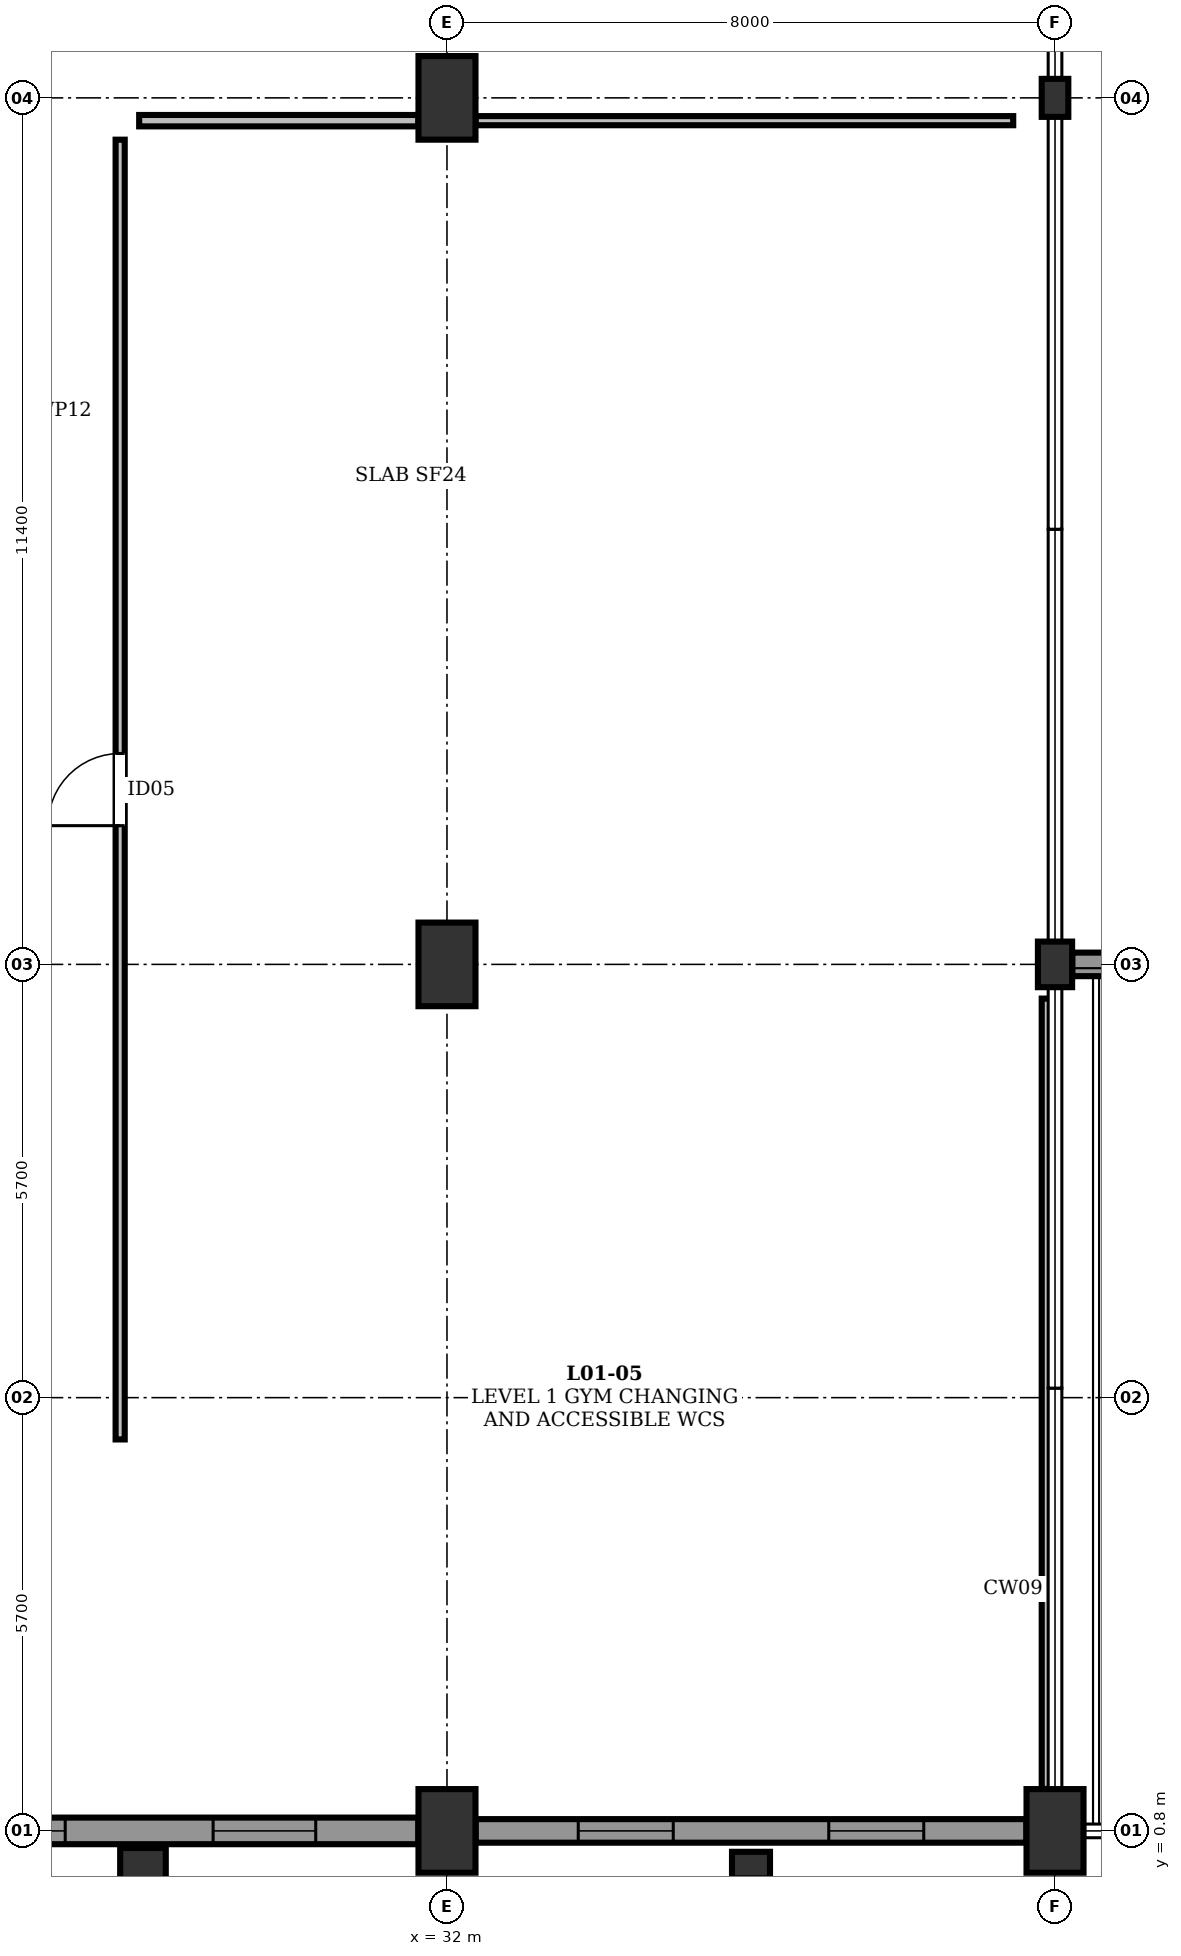
"""IFC4 building model, lengths in metres.
Left out: names, types, materials, properties, quantities, classifications, styles, units other than length and angle.
Written with IfcOpenShell. Run it as: python <this file> out.ifc"""

import sys

from ifc_helpers import new_model, si_unit, direction, frame, frame_2d, origin, origin_2d, place, context, subcontext, project, spatial, rectangle, extrude, element, fill, save


model = new_model("IFC4")
c1 = context("Model", 3, precision=1e-05, world=origin(), true_north=direction((0.0, 1.0)))
c2 = subcontext(c1, "Body", "Model", "MODEL_VIEW")
j1 = project(units=[si_unit("LENGTHUNIT", "METRE"), si_unit("PLANEANGLEUNIT", "RADIAN")], contexts=[c1])
p1 = place(None, origin())
s1 = spatial("IfcSite", under=j1, at=p1, CompositionType="ELEMENT")
p2 = place(p1, origin())
s2 = spatial("IfcBuilding", under=s1, at=p2, CompositionType="ELEMENT")
p3 = place(p2, frame((0.0, 0.0, 5.4)))
s3 = spatial("IfcBuildingStorey", under=s2, at=p3, CompositionType="ELEMENT", Elevation=5.4)
for number, where, z_axis, x_axis in (
    (1, (32.0, 0.8, 0.0), (0.0, 0.0, 1.0), (1.0, 0.0, 0.0)),
    (2, (32.0, 12.2, 0.0), (0.0, 0.0, 1.0), (1.0, 0.0, 0.0)),
    (3, (32.0, 23.6, 0.0), (0.0, 0.0, 1.0), (1.0, 0.0, 0.0)),
    (4, (40.0, 0.8, 0.0), (0.0, 0.0, 1.0), (1.0, 0.0, 0.0)),
):
    element("IfcColumn", number, at=place(p3, frame(where, z_axis=z_axis, x_axis=x_axis)), inside=s3, PredefinedType="COLUMN", context=c2, shape_type="SweptSolid", body=[
        extrude(rectangle(XDim=0.75, YDim=1.1, at=origin_2d()), origin(), (0.0, 0.0, 1.0), 4.8),
    ])
p4 = place(p3, frame((40.0, 12.2, 0.0), z_axis=(0.0, 0.0, 1.0), x_axis=(1.0, 0.0, 0.0)))
e5 = element("IfcColumn", 5, at=p4, inside=s3, PredefinedType="PILASTER", context=c2, shape_type="SweptSolid", body=[
    extrude(rectangle(XDim=0.45, YDim=0.6, at=origin_2d()), origin(), (0.0, 0.0, 1.0), 4.8),
])
p5 = place(p3, frame((40.0, 23.6, 0.0), z_axis=(0.0, 0.0, 1.0), x_axis=(1.0, 0.0, 0.0)))
e6 = element("IfcColumn", 6, at=p5, inside=s3, PredefinedType="PILASTER", context=c2, shape_type="SweptSolid", body=[
    extrude(rectangle(XDim=0.35, YDim=0.5, at=origin_2d()), origin(), (0.0, 0.0, 1.0), 4.8),
])
p6 = place(p3, frame((28.0, 0.35, 0.0), z_axis=(0.0, 0.0, 1.0), x_axis=(0.0, 1.0, 0.0)))
e7 = element("IfcColumn", 7, at=p6, inside=s3, PredefinedType="PILASTER", context=c2, shape_type="SweptSolid", body=[
    extrude(rectangle(XDim=0.45, YDim=0.6, at=origin_2d()), origin(), (0.0, 0.0, 1.0), 4.8),
])
p7 = place(p3, frame((36.0, 0.35, 0.0), z_axis=(0.0, 0.0, 1.0), x_axis=(0.0, 1.0, 0.0)))
e8 = element("IfcColumn", 8, at=p7, inside=s3, PredefinedType="PILASTER", context=c2, shape_type="SweptSolid", body=[
    extrude(rectangle(XDim=0.35, YDim=0.5, at=origin_2d()), origin(), (0.0, 0.0, 1.0), 4.8),
])
p8 = place(p3, frame((24.277, 0.8, 0.0), z_axis=(0.0, 0.0, 1.0), x_axis=(1.0, 0.0, 0.0)))
e9 = element("IfcWall", 9, at=p8, inside=s3, PredefinedType="STANDARD", context=c2, shape_type="SweptSolid", body=[
    extrude(rectangle(XDim=7.346, YDim=0.35, at=frame_2d((3.673, 0.0))), origin(), (0.0, 0.0, 1.0), 3.845),
])
p9 = place(p8, frame((1.35, 0.0, 0.75)))
e10 = element("IfcOpeningElement", 10, at=p9, cuts=e9, PredefinedType="OPENING", context=c2, shape_type="SweptSolid", body=[
    extrude(rectangle(XDim=1.35, YDim=1.55, at=frame_2d((0.675, 0.775))), frame((0.0, 0.187, 0.0), z_axis=(0.0, -1.0, 0.0), x_axis=(1.0, 0.0, 0.0)), (0.0, 0.0, 1.0), 0.374),
])
p10 = place(p8, frame((4.646, 0.0, 0.75)))
e11 = element("IfcOpeningElement", 11, at=p10, cuts=e9, PredefinedType="OPENING", context=c2, shape_type="SweptSolid", body=[
    extrude(rectangle(XDim=1.35, YDim=1.55, at=frame_2d((0.675, 0.775))), frame((0.0, 0.187, 0.0), z_axis=(0.0, -1.0, 0.0), x_axis=(1.0, 0.0, 0.0)), (0.0, 0.0, 1.0), 0.374),
])
p11 = place(p3, frame((32.377, 0.8, 0.0), z_axis=(0.0, 0.0, 1.0), x_axis=(1.0, 0.0, 0.0)))
e12 = element("IfcWall", 12, at=p11, inside=s3, PredefinedType="STANDARD", context=c2, shape_type="SweptSolid", body=[
    extrude(rectangle(XDim=7.246, YDim=0.31, at=frame_2d((3.623, 0.0))), origin(), (0.0, 0.0, 1.0), 4.012),
])
p12 = place(p11, frame((1.35, 0.0, 0.75)))
e13 = element("IfcOpeningElement", 13, at=p12, cuts=e12, PredefinedType="OPENING", context=c2, shape_type="SweptSolid", body=[
    extrude(rectangle(XDim=1.25, YDim=2.5, at=frame_2d((0.625, 1.25))), frame((0.0, 0.167, 0.0), z_axis=(0.0, -1.0, 0.0), x_axis=(1.0, 0.0, 0.0)), (0.0, 0.0, 1.0), 0.334),
])
p13 = place(p11, frame((4.646, 0.0, 0.75)))
e14 = element("IfcOpeningElement", 14, at=p13, cuts=e12, PredefinedType="OPENING", context=c2, shape_type="SweptSolid", body=[
    extrude(rectangle(XDim=1.25, YDim=2.5, at=frame_2d((0.625, 1.25))), frame((0.0, 0.167, 0.0), z_axis=(0.0, -1.0, 0.0), x_axis=(1.0, 0.0, 0.0)), (0.0, 0.0, 1.0), 0.334),
])
p14 = place(p3, frame((40.227, 12.2, 0.0), z_axis=(0.0, 0.0, 1.0), x_axis=(1.0, 0.0, 0.0)))
e15 = element("IfcWall", 15, at=p14, inside=s3, PredefinedType="STANDARD", context=c2, shape_type="SweptSolid", body=[
    extrude(rectangle(XDim=5.396, YDim=0.31, at=frame_2d((2.698, 0.0))), origin(), (0.0, 0.0, 1.0), 3.645),
])
p15 = place(p14, frame((1.35, 0.0, 0.75)))
e16 = element("IfcOpeningElement", 16, at=p15, cuts=e15, PredefinedType="OPENING", context=c2, shape_type="SweptSolid", body=[
    extrude(rectangle(XDim=0.9, YDim=2.05, at=frame_2d((0.45, 1.025))), frame((0.0, 0.167, 0.0), z_axis=(0.0, -1.0, 0.0), x_axis=(1.0, 0.0, 0.0)), (0.0, 0.0, 1.0), 0.334),
])
p16 = place(p14, frame((3.146, 0.0, 0.75)))
e17 = element("IfcOpeningElement", 17, at=p16, cuts=e15, PredefinedType="OPENING", context=c2, shape_type="SweptSolid", body=[
    extrude(rectangle(XDim=0.9, YDim=2.05, at=frame_2d((0.45, 1.025))), frame((0.0, 0.167, 0.0), z_axis=(0.0, -1.0, 0.0), x_axis=(1.0, 0.0, 0.0)), (0.0, 0.0, 1.0), 0.334),
])
p17 = place(p3, frame((27.7, 5.95, 0.0), z_axis=(0.0, 0.0, 1.0), x_axis=(0.0, 1.0, 0.0)))
e18 = element("IfcWall", 18, at=p17, inside=s3, PredefinedType="PARTITIONING", context=c2, shape_type="SweptSolid", body=[
    extrude(rectangle(XDim=17.1, YDim=0.12, at=frame_2d((8.55, 0.0))), origin(), (0.0, 0.0, 1.0), 3.645),
])
p18 = place(p17, frame((8.075, 0.0, 0.0)))
e19 = element("IfcOpeningElement", 19, at=p18, cuts=e18, PredefinedType="OPENING", context=c2, shape_type="SweptSolid", body=[
    extrude(rectangle(XDim=0.95, YDim=2.15, at=frame_2d((0.475, 1.075))), frame((0.0, 0.072, 0.0), z_axis=(0.0, -1.0, 0.0), x_axis=(1.0, 0.0, 0.0)), (0.0, 0.0, 1.0), 0.144),
])
p19 = place(p3, frame((27.95, 23.3, 0.0), z_axis=(0.0, 0.0, 1.0), x_axis=(1.0, 0.0, 0.0)))
e20 = element("IfcWall", 20, at=p19, inside=s3, PredefinedType="PARTITIONING", context=c2, shape_type="SweptSolid", body=[
    extrude(rectangle(XDim=3.673, YDim=0.15, at=frame_2d((1.836, 0.0))), origin(), (0.0, 0.0, 1.0), 3.645),
])
p20 = place(p3, frame((32.377, 23.3, 0.0), z_axis=(0.0, 0.0, 1.0), x_axis=(1.0, 0.0, 0.0)))
e21 = element("IfcWall", 21, at=p20, inside=s3, PredefinedType="PARTITIONING", context=c2, shape_type="SweptSolid", body=[
    extrude(rectangle(XDim=7.073, YDim=0.12, at=frame_2d((3.537, 0.0))), origin(), (0.0, 0.0, 1.0), 3.645),
])
p21 = place(p3, frame((39.9, 1.352, 0.0), z_axis=(0.0, 0.0, 1.0), x_axis=(0.0, 1.0, 0.0)))
e22 = element("IfcWall", 22, at=p21, inside=s3, PredefinedType="PARTITIONING", context=c2, shape_type="SweptSolid", body=[
    extrude(rectangle(XDim=10.398, YDim=0.15, at=frame_2d((5.199, 0.0))), origin(), (0.0, 0.0, 1.0), 3.645),
])
p22 = place(p9, origin())
e23 = element("IfcWindow", 23, at=p22, inside=s3, PartitioningType="DOUBLE_PANEL_VERTICAL", PredefinedType="WINDOW", context=c2, shape_type="SweptSolid", body=[
    extrude(rectangle(XDim=1.35, YDim=1.55, at=frame_2d((0.675, 0.775))), frame((0.0, 0.08, 0.0), z_axis=(0.0, -1.0, 0.0), x_axis=(1.0, 0.0, 0.0)), (0.0, 0.0, 1.0), 0.06),
])
fill(e10, e23)
p23 = place(p10, origin())
e24 = element("IfcWindow", 24, at=p23, inside=s3, PartitioningType="DOUBLE_PANEL_VERTICAL", PredefinedType="WINDOW", context=c2, shape_type="SweptSolid", body=[
    extrude(rectangle(XDim=1.35, YDim=1.55, at=frame_2d((0.675, 0.775))), frame((0.0, 0.08, 0.0), z_axis=(0.0, -1.0, 0.0), x_axis=(1.0, 0.0, 0.0)), (0.0, 0.0, 1.0), 0.06),
])
fill(e11, e24)
p24 = place(p12, origin())
e25 = element("IfcWindow", 25, at=p24, inside=s3, PartitioningType="SINGLE_PANEL", PredefinedType="WINDOW", context=c2, shape_type="SweptSolid", body=[
    extrude(rectangle(XDim=1.25, YDim=2.5, at=frame_2d((0.625, 1.25))), frame((0.0, 0.08, 0.0), z_axis=(0.0, -1.0, 0.0), x_axis=(1.0, 0.0, 0.0)), (0.0, 0.0, 1.0), 0.06),
])
fill(e13, e25)
p25 = place(p13, origin())
e26 = element("IfcWindow", 26, at=p25, inside=s3, PartitioningType="SINGLE_PANEL", PredefinedType="WINDOW", context=c2, shape_type="SweptSolid", body=[
    extrude(rectangle(XDim=1.25, YDim=2.5, at=frame_2d((0.625, 1.25))), frame((0.0, 0.08, 0.0), z_axis=(0.0, -1.0, 0.0), x_axis=(1.0, 0.0, 0.0)), (0.0, 0.0, 1.0), 0.06),
])
fill(e14, e26)
p26 = place(p18, origin())
e27 = element("IfcDoor", 27, at=p26, inside=s3, OperationType="SINGLE_SWING_LEFT", PredefinedType="DOOR", context=c2, shape_type="SweptSolid", body=[
    extrude(rectangle(XDim=0.95, YDim=2.15, at=frame_2d((0.475, 1.075))), frame((0.0, 0.025, 0.0), z_axis=(0.0, -1.0, 0.0), x_axis=(1.0, 0.0, 0.0)), (0.0, 0.0, 1.0), 0.05),
])
fill(e19, e27)
save(model, sys.argv[1])
